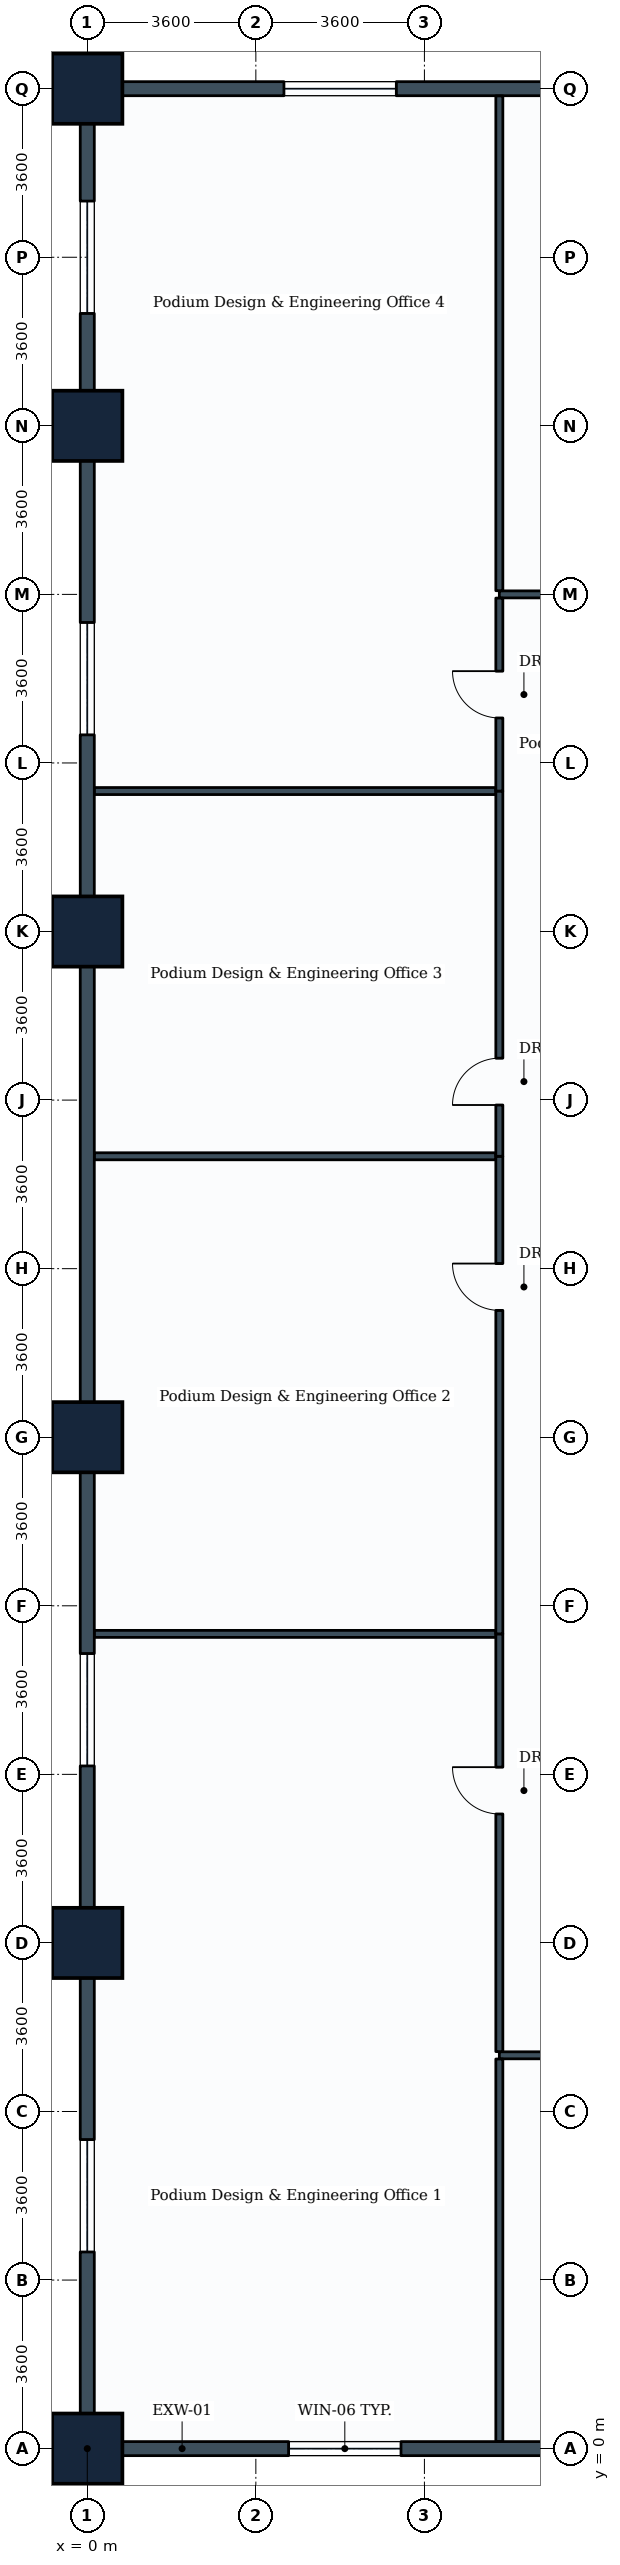
"""IFC4 building model, lengths in metres.
Left out: names, types, materials, properties, quantities, classifications, styles, units other than length and angle.
Written with IfcOpenShell. Run it as: python <this file> out.ifc"""

import sys

from ifc_helpers import new_model, si_unit, direction, frame, frame_2d, origin, origin_2d, place, context, subcontext, project, spatial, rectangle, extrude, element, fill, save


model = new_model("IFC4")
c1 = context("Model", 3, precision=1e-05, world=origin(), true_north=direction((0.0, 1.0)))
c2 = subcontext(c1, "Body", "Model", "MODEL_VIEW")
j1 = project(units=[si_unit("LENGTHUNIT", "METRE"), si_unit("PLANEANGLEUNIT", "RADIAN")], contexts=[c1])
p1 = place(None, origin())
s1 = spatial("IfcSite", under=j1, at=p1, CompositionType="ELEMENT")
p2 = place(p1, origin())
s2 = spatial("IfcBuilding", under=s1, at=p2, CompositionType="ELEMENT")
p3 = place(p2, frame((0.0, 0.0, 5.4)))
s3 = spatial("IfcBuildingStorey", under=s2, at=p3, CompositionType="ELEMENT", Elevation=5.4)
for number, where, z_axis, x_axis in (
    (1, (0.0, 0.0, 0.0), (0.0, 0.0, 1.0), (1.0, 0.0, 0.0)),
    (2, (0.0, 10.8, 0.0), (0.0, 0.0, 1.0), (1.0, 0.0, 0.0)),
    (3, (0.0, 21.6, 0.0), (0.0, 0.0, 1.0), (1.0, 0.0, 0.0)),
    (4, (0.0, 32.4, 0.0), (0.0, 0.0, 1.0), (1.0, 0.0, 0.0)),
    (5, (0.0, 43.2, 0.0), (0.0, 0.0, 1.0), (1.0, 0.0, 0.0)),
    (6, (0.0, 50.4, 0.0), (0.0, 0.0, 1.0), (1.0, 0.0, 0.0)),
):
    element("IfcColumn", number, at=place(p3, frame(where, z_axis=z_axis, x_axis=x_axis)), inside=s3, PredefinedType="COLUMN", context=c2, shape_type="SweptSolid", body=[
        extrude(rectangle(XDim=1.5, YDim=1.5, at=origin_2d()), origin(), (0.0, 0.0, 1.0), 4.8),
    ])
p4 = place(p3, frame((10.8, 0.0, 0.0), z_axis=(0.0, 0.0, 1.0), x_axis=(-1.0, 0.0, 0.0)))
e7 = element("IfcWall", 7, at=p4, inside=s3, PredefinedType="STANDARD", context=c2, shape_type="SweptSolid", body=[
    extrude(rectangle(XDim=10.8, YDim=0.3, at=frame_2d((5.4, 0.0))), origin(), (0.0, 0.0, 1.0), 3.83),
])
p5 = place(p4, frame((4.1, 0.0, 0.85)))
e8 = element("IfcOpeningElement", 8, at=p5, cuts=e7, PredefinedType="OPENING", context=c2, shape_type="SweptSolid", body=[
    extrude(rectangle(XDim=2.4, YDim=1.6, at=frame_2d((1.2, 0.8))), frame((0.0, 0.16, 0.0), z_axis=(0.0, -1.0, 0.0), x_axis=(1.0, 0.0, 0.0)), (0.0, 0.0, 1.0), 0.32),
])
p6 = place(p3, frame((0.0, 50.4, 0.0), z_axis=(0.0, 0.0, 1.0), x_axis=(1.0, 0.0, 0.0)))
e9 = element("IfcWall", 9, at=p6, inside=s3, PredefinedType="STANDARD", context=c2, shape_type="SweptSolid", body=[
    extrude(rectangle(XDim=10.8, YDim=0.3, at=frame_2d((5.4, 0.0))), origin(), (0.0, 0.0, 1.0), 3.83),
])
p7 = place(p6, frame((4.2, 0.0, 0.85)))
e10 = element("IfcOpeningElement", 10, at=p7, cuts=e9, PredefinedType="OPENING", context=c2, shape_type="SweptSolid", body=[
    extrude(rectangle(XDim=2.4, YDim=1.6, at=frame_2d((1.2, 0.8))), frame((0.0, 0.16, 0.0), z_axis=(0.0, -1.0, 0.0), x_axis=(1.0, 0.0, 0.0)), (0.0, 0.0, 1.0), 0.32),
])
p8 = place(p3, frame((0.0, 0.0, 0.0), z_axis=(0.0, 0.0, 1.0), x_axis=(0.0, 1.0, 0.0)))
e11 = element("IfcWall", 11, at=p8, inside=s3, PredefinedType="STANDARD", context=c2, shape_type="SweptSolid", body=[
    extrude(rectangle(XDim=10.8, YDim=0.3, at=frame_2d((5.4, 0.0))), origin(), (0.0, 0.0, 1.0), 3.83),
])
p9 = place(p8, frame((4.2, 0.0, 0.85)))
e12 = element("IfcOpeningElement", 12, at=p9, cuts=e11, PredefinedType="OPENING", context=c2, shape_type="SweptSolid", body=[
    extrude(rectangle(XDim=2.4, YDim=1.6, at=frame_2d((1.2, 0.8))), frame((0.0, 0.16, 0.0), z_axis=(0.0, -1.0, 0.0), x_axis=(1.0, 0.0, 0.0)), (0.0, 0.0, 1.0), 0.32),
])
p10 = place(p3, frame((0.0, 10.8, 0.0), z_axis=(0.0, 0.0, 1.0), x_axis=(0.0, 1.0, 0.0)))
e13 = element("IfcWall", 13, at=p10, inside=s3, PredefinedType="STANDARD", context=c2, shape_type="SweptSolid", body=[
    extrude(rectangle(XDim=10.8, YDim=0.3, at=frame_2d((5.4, 0.0))), origin(), (0.0, 0.0, 1.0), 3.83),
])
p11 = place(p10, frame((3.78, 0.0, 0.85)))
e14 = element("IfcOpeningElement", 14, at=p11, cuts=e13, PredefinedType="OPENING", context=c2, shape_type="SweptSolid", body=[
    extrude(rectangle(XDim=2.4, YDim=1.6, at=frame_2d((1.2, 0.8))), frame((0.0, 0.16, 0.0), z_axis=(0.0, -1.0, 0.0), x_axis=(1.0, 0.0, 0.0)), (0.0, 0.0, 1.0), 0.32),
])
p12 = place(p3, frame((0.0, 21.6, 0.0), z_axis=(0.0, 0.0, 1.0), x_axis=(0.0, 1.0, 0.0)))
e15 = element("IfcWall", 15, at=p12, inside=s3, PredefinedType="STANDARD", context=c2, shape_type="SweptSolid", body=[
    extrude(rectangle(XDim=10.8, YDim=0.3, at=frame_2d((5.4, 0.0))), origin(), (0.0, 0.0, 1.0), 3.83),
])
p13 = place(p3, frame((0.0, 32.4, 0.0), z_axis=(0.0, 0.0, 1.0), x_axis=(0.0, 1.0, 0.0)))
e16 = element("IfcWall", 16, at=p13, inside=s3, PredefinedType="STANDARD", context=c2, shape_type="SweptSolid", body=[
    extrude(rectangle(XDim=10.8, YDim=0.3, at=frame_2d((5.4, 0.0))), origin(), (0.0, 0.0, 1.0), 3.83),
])
p14 = place(p13, frame((4.2, 0.0, 0.85)))
e17 = element("IfcOpeningElement", 17, at=p14, cuts=e16, PredefinedType="OPENING", context=c2, shape_type="SweptSolid", body=[
    extrude(rectangle(XDim=2.4, YDim=1.6, at=frame_2d((1.2, 0.8))), frame((0.0, 0.16, 0.0), z_axis=(0.0, -1.0, 0.0), x_axis=(1.0, 0.0, 0.0)), (0.0, 0.0, 1.0), 0.32),
])
p15 = place(p3, frame((0.0, 43.2, 0.0), z_axis=(0.0, 0.0, 1.0), x_axis=(0.0, 1.0, 0.0)))
e18 = element("IfcWall", 18, at=p15, inside=s3, PredefinedType="STANDARD", context=c2, shape_type="SweptSolid", body=[
    extrude(rectangle(XDim=7.2, YDim=0.3, at=frame_2d((3.6, 0.0))), origin(), (0.0, 0.0, 1.0), 3.83),
])
p16 = place(p15, frame((2.4, 0.0, 0.85)))
e19 = element("IfcOpeningElement", 19, at=p16, cuts=e18, PredefinedType="OPENING", context=c2, shape_type="SweptSolid", body=[
    extrude(rectangle(XDim=2.4, YDim=1.6, at=frame_2d((1.2, 0.8))), frame((0.0, 0.16, 0.0), z_axis=(0.0, -1.0, 0.0), x_axis=(1.0, 0.0, 0.0)), (0.0, 0.0, 1.0), 0.32),
])
p17 = place(p3, frame((8.8, 8.4, 0.0), z_axis=(0.0, 0.0, 1.0), x_axis=(1.0, 0.0, 0.0)))
e20 = element("IfcWall", 20, at=p17, inside=s3, PredefinedType="PARTITIONING", context=c2, shape_type="SweptSolid", body=[
    extrude(rectangle(XDim=14.0, YDim=0.15, at=frame_2d((7.0, 0.0))), origin(), (0.0, 0.0, 1.0), 3.83),
])
p18 = place(p17, frame((7.555, 0.0, 0.0)))
e21 = element("IfcOpeningElement", 21, at=p18, cuts=e20, PredefinedType="OPENING", context=c2, shape_type="SweptSolid", body=[
    extrude(rectangle(XDim=1.6, YDim=2.2, at=frame_2d((0.8, 1.1))), frame((0.0, 0.085, 0.0), z_axis=(0.0, -1.0, 0.0), x_axis=(1.0, 0.0, 0.0)), (0.0, 0.0, 1.0), 0.17),
])
p19 = place(p3, frame((8.8, 39.6, 0.0), z_axis=(0.0, 0.0, 1.0), x_axis=(1.0, 0.0, 0.0)))
e22 = element("IfcWall", 22, at=p19, inside=s3, PredefinedType="PARTITIONING", context=c2, shape_type="SweptSolid", body=[
    extrude(rectangle(XDim=16.4, YDim=0.15, at=frame_2d((8.2, 0.0))), origin(), (0.0, 0.0, 1.0), 3.83),
])
p20 = place(p19, frame((7.4, 0.0, 0.0)))
e23 = element("IfcOpeningElement", 23, at=p20, cuts=e22, PredefinedType="OPENING", context=c2, shape_type="SweptSolid", body=[
    extrude(rectangle(XDim=1.6, YDim=2.2, at=frame_2d((0.8, 1.1))), frame((0.0, 0.085, 0.0), z_axis=(0.0, -1.0, 0.0), x_axis=(1.0, 0.0, 0.0)), (0.0, 0.0, 1.0), 0.17),
])
p21 = place(p3, frame((8.8, 0.154, 0.0), z_axis=(0.0, 0.0, 1.0), x_axis=(0.0, 1.0, 0.0)))
e24 = element("IfcWall", 24, at=p21, inside=s3, PredefinedType="PARTITIONING", context=c2, shape_type="SweptSolid", body=[
    extrude(rectangle(XDim=8.167, YDim=0.15, at=frame_2d((4.083, 0.0))), origin(), (0.0, 0.0, 1.0), 4.485),
])
p22 = place(p3, frame((8.8, 8.479, 0.0), z_axis=(0.0, 0.0, 1.0), x_axis=(0.0, 1.0, 0.0)))
e25 = element("IfcWall", 25, at=p22, inside=s3, PredefinedType="PARTITIONING", context=c2, shape_type="SweptSolid", body=[
    extrude(rectangle(XDim=8.921, YDim=0.15, at=frame_2d((4.46, 0.0))), origin(), (0.0, 0.0, 1.0), 3.83),
])
p23 = place(p22, frame((5.075, 0.0, 0.0)))
e26 = element("IfcOpeningElement", 26, at=p23, cuts=e25, PredefinedType="OPENING", context=c2, shape_type="SweptSolid", body=[
    extrude(rectangle(XDim=1.0, YDim=2.1, at=frame_2d((0.5, 1.05))), frame((0.0, 0.085, 0.0), z_axis=(0.0, -1.0, 0.0), x_axis=(1.0, 0.0, 0.0)), (0.0, 0.0, 1.0), 0.17),
])
p24 = place(p3, frame((0.154, 17.4, 0.0), z_axis=(0.0, 0.0, 1.0), x_axis=(1.0, 0.0, 0.0)))
e27 = element("IfcWall", 27, at=p24, inside=s3, PredefinedType="PARTITIONING", context=c2, shape_type="SweptSolid", body=[
    extrude(rectangle(XDim=8.567, YDim=0.15, at=frame_2d((4.283, 0.0))), origin(), (0.0, 0.0, 1.0), 4.03),
])
p25 = place(p3, frame((8.8, 17.4, 0.0), z_axis=(0.0, 0.0, 1.0), x_axis=(0.0, 1.0, 0.0)))
e28 = element("IfcWall", 28, at=p25, inside=s3, PredefinedType="PARTITIONING", context=c2, shape_type="SweptSolid", body=[
    extrude(rectangle(XDim=10.2, YDim=0.15, at=frame_2d((5.1, 0.0))), origin(), (0.0, 0.0, 1.0), 3.83),
])
p26 = place(p25, frame((6.909, 0.0, 0.0)))
e29 = element("IfcOpeningElement", 29, at=p26, cuts=e28, PredefinedType="OPENING", context=c2, shape_type="SweptSolid", body=[
    extrude(rectangle(XDim=1.0, YDim=2.1, at=frame_2d((0.5, 1.05))), frame((0.0, 0.085, 0.0), z_axis=(0.0, -1.0, 0.0), x_axis=(1.0, 0.0, 0.0)), (0.0, 0.0, 1.0), 0.17),
])
p27 = place(p3, frame((0.154, 27.6, 0.0), z_axis=(0.0, 0.0, 1.0), x_axis=(1.0, 0.0, 0.0)))
e30 = element("IfcWall", 30, at=p27, inside=s3, PredefinedType="PARTITIONING", context=c2, shape_type="SweptSolid", body=[
    extrude(rectangle(XDim=8.567, YDim=0.15, at=frame_2d((4.283, 0.0))), origin(), (0.0, 0.0, 1.0), 4.03),
])
p28 = place(p3, frame((8.8, 27.6, 0.0), z_axis=(0.0, 0.0, 1.0), x_axis=(0.0, 1.0, 0.0)))
e31 = element("IfcWall", 31, at=p28, inside=s3, PredefinedType="PARTITIONING", context=c2, shape_type="SweptSolid", body=[
    extrude(rectangle(XDim=7.8, YDim=0.15, at=frame_2d((3.9, 0.0))), origin(), (0.0, 0.0, 1.0), 3.83),
])
p29 = place(p28, frame((1.095, 0.0, 0.0)))
e32 = element("IfcOpeningElement", 32, at=p29, cuts=e31, PredefinedType="OPENING", context=c2, shape_type="SweptSolid", body=[
    extrude(rectangle(XDim=1.0, YDim=2.1, at=frame_2d((0.5, 1.05))), frame((0.0, 0.085, 0.0), z_axis=(0.0, -1.0, 0.0), x_axis=(1.0, 0.0, 0.0)), (0.0, 0.0, 1.0), 0.17),
])
p30 = place(p3, frame((0.154, 35.4, 0.0), z_axis=(0.0, 0.0, 1.0), x_axis=(1.0, 0.0, 0.0)))
e33 = element("IfcWall", 33, at=p30, inside=s3, PredefinedType="PARTITIONING", context=c2, shape_type="SweptSolid", body=[
    extrude(rectangle(XDim=8.567, YDim=0.15, at=frame_2d((4.283, 0.0))), origin(), (0.0, 0.0, 1.0), 4.03),
])
p31 = place(p3, frame((8.8, 35.4, 0.0), z_axis=(0.0, 0.0, 1.0), x_axis=(0.0, 1.0, 0.0)))
e34 = element("IfcWall", 34, at=p31, inside=s3, PredefinedType="PARTITIONING", context=c2, shape_type="SweptSolid", body=[
    extrude(rectangle(XDim=4.121, YDim=0.15, at=frame_2d((2.061, 0.0))), origin(), (0.0, 0.0, 1.0), 4.485),
])
p32 = place(p31, frame((1.561, 0.0, 0.0)))
e35 = element("IfcOpeningElement", 35, at=p32, cuts=e34, PredefinedType="OPENING", context=c2, shape_type="SweptSolid", body=[
    extrude(rectangle(XDim=1.0, YDim=2.1, at=frame_2d((0.5, 1.05))), frame((0.0, 0.085, 0.0), z_axis=(0.0, -1.0, 0.0), x_axis=(1.0, 0.0, 0.0)), (0.0, 0.0, 1.0), 0.17),
])
p33 = place(p3, frame((8.8, 39.679, 0.0), z_axis=(0.0, 0.0, 1.0), x_axis=(0.0, 1.0, 0.0)))
e36 = element("IfcWall", 36, at=p33, inside=s3, PredefinedType="PARTITIONING", context=c2, shape_type="SweptSolid", body=[
    extrude(rectangle(XDim=10.567, YDim=0.15, at=frame_2d((5.284, 0.0))), origin(), (0.0, 0.0, 1.0), 3.83),
])
p34 = place(p5, origin())
e37 = element("IfcWindow", 37, at=p34, inside=s3, PartitioningType="SINGLE_PANEL", PredefinedType="WINDOW", context=c2, shape_type="SweptSolid", body=[
    extrude(rectangle(XDim=2.4, YDim=1.6, at=frame_2d((1.2, 0.8))), frame((0.0, 0.03, 0.0), z_axis=(0.0, -1.0, 0.0), x_axis=(1.0, 0.0, 0.0)), (0.0, 0.0, 1.0), 0.06),
])
fill(e8, e37)
p35 = place(p7, origin())
e38 = element("IfcWindow", 38, at=p35, inside=s3, PartitioningType="SINGLE_PANEL", PredefinedType="WINDOW", context=c2, shape_type="SweptSolid", body=[
    extrude(rectangle(XDim=2.4, YDim=1.6, at=frame_2d((1.2, 0.8))), frame((0.0, 0.03, 0.0), z_axis=(0.0, -1.0, 0.0), x_axis=(1.0, 0.0, 0.0)), (0.0, 0.0, 1.0), 0.06),
])
fill(e10, e38)
p36 = place(p9, origin())
e39 = element("IfcWindow", 39, at=p36, inside=s3, PartitioningType="SINGLE_PANEL", PredefinedType="WINDOW", context=c2, shape_type="SweptSolid", body=[
    extrude(rectangle(XDim=2.4, YDim=1.6, at=frame_2d((1.2, 0.8))), frame((0.0, 0.03, 0.0), z_axis=(0.0, -1.0, 0.0), x_axis=(1.0, 0.0, 0.0)), (0.0, 0.0, 1.0), 0.06),
])
fill(e12, e39)
p37 = place(p11, origin())
e40 = element("IfcWindow", 40, at=p37, inside=s3, PartitioningType="SINGLE_PANEL", PredefinedType="WINDOW", context=c2, shape_type="SweptSolid", body=[
    extrude(rectangle(XDim=2.4, YDim=1.6, at=frame_2d((1.2, 0.8))), frame((0.0, 0.03, 0.0), z_axis=(0.0, -1.0, 0.0), x_axis=(1.0, 0.0, 0.0)), (0.0, 0.0, 1.0), 0.06),
])
fill(e14, e40)
p38 = place(p14, origin())
e41 = element("IfcWindow", 41, at=p38, inside=s3, PartitioningType="SINGLE_PANEL", PredefinedType="WINDOW", context=c2, shape_type="SweptSolid", body=[
    extrude(rectangle(XDim=2.4, YDim=1.6, at=frame_2d((1.2, 0.8))), frame((0.0, 0.03, 0.0), z_axis=(0.0, -1.0, 0.0), x_axis=(1.0, 0.0, 0.0)), (0.0, 0.0, 1.0), 0.06),
])
fill(e17, e41)
p39 = place(p16, origin())
e42 = element("IfcWindow", 42, at=p39, inside=s3, PartitioningType="SINGLE_PANEL", PredefinedType="WINDOW", context=c2, shape_type="SweptSolid", body=[
    extrude(rectangle(XDim=2.4, YDim=1.6, at=frame_2d((1.2, 0.8))), frame((0.0, 0.03, 0.0), z_axis=(0.0, -1.0, 0.0), x_axis=(1.0, 0.0, 0.0)), (0.0, 0.0, 1.0), 0.06),
])
fill(e19, e42)
p40 = place(p23, origin())
e43 = element("IfcDoor", 43, at=p40, inside=s3, OperationType="SINGLE_SWING_RIGHT", PredefinedType="DOOR", context=c2, shape_type="SweptSolid", body=[
    extrude(rectangle(XDim=1.0, YDim=2.1, at=frame_2d((0.5, 1.05))), frame((0.0, 0.025, 0.0), z_axis=(0.0, -1.0, 0.0), x_axis=(1.0, 0.0, 0.0)), (0.0, 0.0, 1.0), 0.05),
])
fill(e26, e43)
p41 = place(p26, origin())
e44 = element("IfcDoor", 44, at=p41, inside=s3, OperationType="SINGLE_SWING_RIGHT", PredefinedType="DOOR", context=c2, shape_type="SweptSolid", body=[
    extrude(rectangle(XDim=1.0, YDim=2.1, at=frame_2d((0.5, 1.05))), frame((0.0, 0.025, 0.0), z_axis=(0.0, -1.0, 0.0), x_axis=(1.0, 0.0, 0.0)), (0.0, 0.0, 1.0), 0.05),
])
fill(e29, e44)
p42 = place(p29, origin())
e45 = element("IfcDoor", 45, at=p42, inside=s3, OperationType="SINGLE_SWING_LEFT", PredefinedType="DOOR", context=c2, shape_type="SweptSolid", body=[
    extrude(rectangle(XDim=1.0, YDim=2.1, at=frame_2d((0.5, 1.05))), frame((0.0, 0.025, 0.0), z_axis=(0.0, -1.0, 0.0), x_axis=(1.0, 0.0, 0.0)), (0.0, 0.0, 1.0), 0.05),
])
fill(e32, e45)
p43 = place(p32, origin())
e46 = element("IfcDoor", 46, at=p43, inside=s3, OperationType="SINGLE_SWING_RIGHT", PredefinedType="DOOR", context=c2, shape_type="SweptSolid", body=[
    extrude(rectangle(XDim=1.0, YDim=2.1, at=frame_2d((0.5, 1.05))), frame((0.0, 0.025, 0.0), z_axis=(0.0, -1.0, 0.0), x_axis=(1.0, 0.0, 0.0)), (0.0, 0.0, 1.0), 0.05),
])
fill(e35, e46)
save(model, sys.argv[1])
